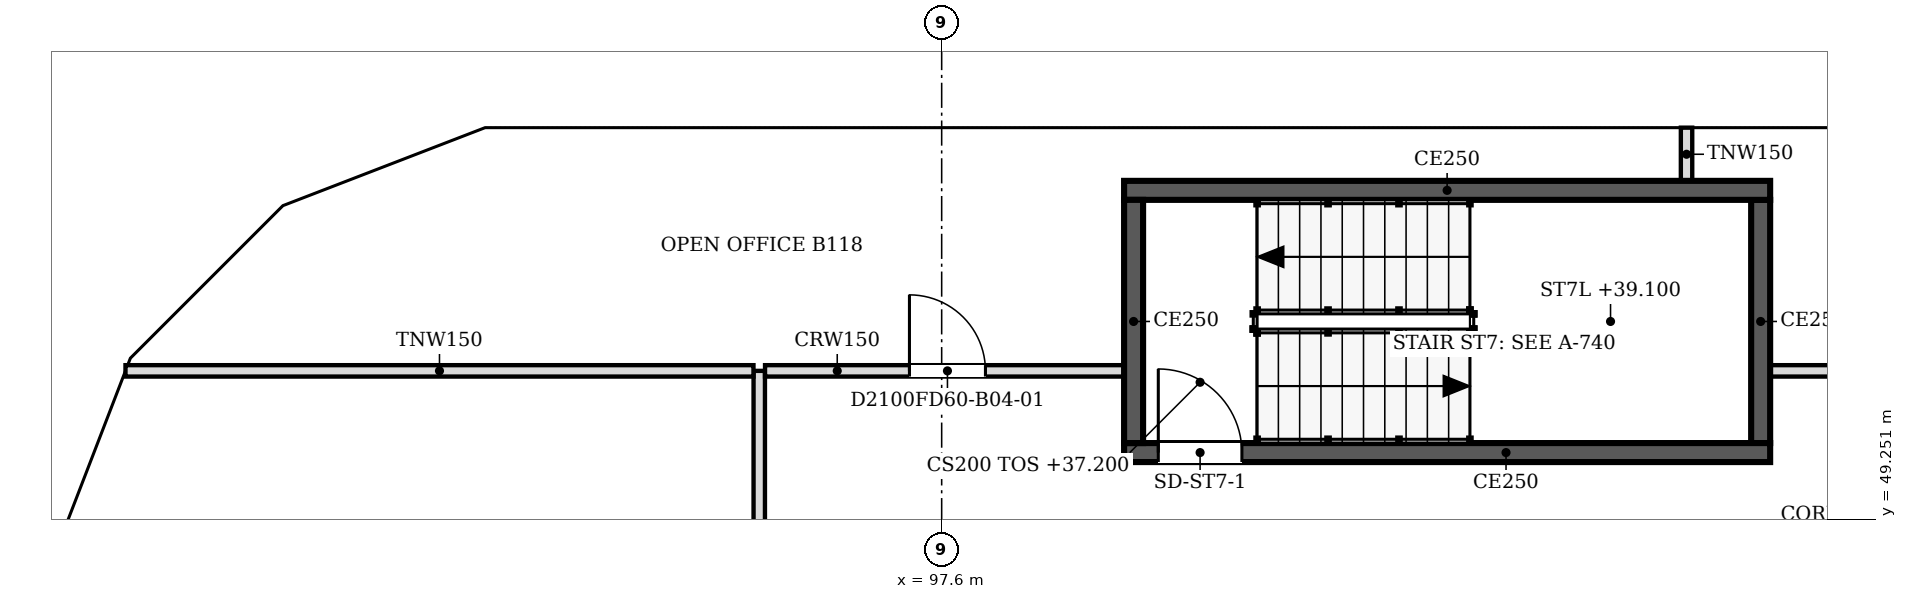
"""IFC4 building model, lengths in metres.
Left out: names, types, materials, properties, quantities, classifications, styles, units other than length and angle.
Written with IfcOpenShell. Run it as: python <this file> out.ifc"""

import sys

from ifc_helpers import new_model, si_unit, direction, frame, frame_2d, origin, place, context, subcontext, project, spatial, polyline, rectangle, outline, extrude, faceted_brep, source, transform, mapped, element, fill, save


model = new_model("IFC4")
c1 = context("Model", 3, precision=1e-05, world=origin(), true_north=direction((0.0, 1.0)))
c2 = subcontext(c1, "Body", "Model", "MODEL_VIEW")
j1 = project(units=[si_unit("LENGTHUNIT", "METRE"), si_unit("PLANEANGLEUNIT", "RADIAN")], contexts=[c1])
p1 = place(None, origin())
s1 = spatial("IfcSite", under=j1, at=p1, CompositionType="ELEMENT")
p2 = place(p1, origin())
s2 = spatial("IfcBuilding", under=s1, at=p2, CompositionType="ELEMENT")
p3 = place(p2, frame((0.0, 0.0, 37.2)))
s3 = spatial("IfcBuildingStorey", under=s2, at=p3, CompositionType="ELEMENT", Elevation=37.2)
m1 = source(origin(), c2, "Body", "SweptSolid", [
    extrude(outline(polyline([(3.05, 0.0), (6.1, 3.8), (3.05, 7.6), (0.0, 3.8), (3.05, 0.0)])), frame((0.0, 0.25, 0.0), z_axis=(0.0, -1.0, 0.0), x_axis=(1.0, 0.0, 0.0)), (0.0, 0.0, 1.0), 0.5),
])
p4 = place(p3, frame((109.8, 54.65, -3.8), z_axis=(0.0, 0.0, 1.0), x_axis=(-1.0, 0.0, 0.0)))
e1 = element("IfcWall", 1, at=p4, inside=s3, PredefinedType="SOLIDWALL", context=c2, shape_type="MappedRepresentation", body=[
    mapped(m1, transform((0.0, 0.0, 0.0), scale=1.0)),
])
m2 = source(origin(), c2, "Body", "SweptSolid", [
    extrude(outline(polyline([(3.05, 0.399), (5.78, 3.8), (3.05, 7.201), (0.321, 3.8), (3.05, 0.399)])), frame((0.0, 0.26, 0.0), z_axis=(0.0, -1.0, 0.0), x_axis=(1.0, 0.0, 0.0)), (0.0, 0.0, 1.0), 0.52),
])
p5 = place(p4, origin())
e2 = element("IfcOpeningElement", 2, at=p5, cuts=e1, PredefinedType="OPENING", context=c2, shape_type="MappedRepresentation", body=[
    mapped(m2, transform((0.0, 0.0, 0.0), scale=1.0)),
])
m3 = source(origin(), c2, "Body", "Brep", [
    faceted_brep([(3.05, -0.25, 0.0), (6.1, -0.25, 3.8), (6.1, -0.25, 3.8), (3.05, -0.25, 7.6), (0.0, -0.25, 3.8), (0.0, 0.25, 3.8), (3.05, 0.25, 7.6), (6.1, 0.25, 3.8), (6.1, 0.25, 3.8), (3.05, 0.25, 0.0)], [[[0, 1, 2, 3, 4]], [[5, 6, 7, 8, 9]], [[9, 8, 1, 0]], [[7, 6, 3, 2]], [[6, 5, 4, 3]], [[5, 9, 0, 4]], [[1, 8, 7, 2]]]),
])
p6 = place(p3, frame((103.7, 54.65, -3.8), z_axis=(0.0, 0.0, 1.0), x_axis=(-1.0, 0.0, 0.0)))
e3 = element("IfcWall", 3, at=p6, inside=s3, PredefinedType="SOLIDWALL", context=c2, shape_type="MappedRepresentation", body=[
    mapped(m3, transform((0.0, 0.0, 0.0), scale=1.0)),
])
p7 = place(p6, origin())
e4 = element("IfcOpeningElement", 4, at=p7, cuts=e3, PredefinedType="OPENING", context=c2, shape_type="MappedRepresentation", body=[
    mapped(m2, transform((0.0, 0.0, 0.0), scale=1.0)),
])
m4 = source(origin(), c2, "Body", "Brep", [
    faceted_brep([(3.05, -0.25, 0.0), (6.053, -0.25, 3.8), (3.05, -0.25, 7.6), (0.0, -0.25, 3.8), (0.0, 0.25, 3.8), (3.05, 0.25, 7.6), (6.007, 0.25, 3.859), (6.007, 0.25, 3.741), (3.05, 0.25, 0.0), (6.053, 0.0, 3.8)], [[[0, 1, 2, 3]], [[4, 5, 6, 7, 8]], [[8, 7, 9, 1, 0]], [[6, 5, 2, 1, 9]], [[5, 4, 3, 2]], [[4, 8, 0, 3]], [[9, 7, 6]]]),
])
p8 = place(p3, frame((97.6, 54.65, -3.8), z_axis=(0.0, 0.0, 1.0), x_axis=(-1.0, 0.0, 0.0)))
e5 = element("IfcWall", 5, at=p8, inside=s3, PredefinedType="SOLIDWALL", context=c2, shape_type="MappedRepresentation", body=[
    mapped(m4, transform((0.0, 0.0, 0.0), scale=1.0)),
])
m5 = source(origin(), c2, "Body", "SweptSolid", [
    extrude(outline(polyline([(3.049, 0.401), (5.735, 3.8), (3.049, 7.199), (0.321, 3.8), (3.049, 0.401)])), frame((0.0, 0.26, 0.0), z_axis=(0.0, -1.0, 0.0), x_axis=(1.0, 0.0, 0.0)), (0.0, 0.0, 1.0), 0.52),
])
p9 = place(p8, origin())
e6 = element("IfcOpeningElement", 6, at=p9, cuts=e5, PredefinedType="OPENING", context=c2, shape_type="MappedRepresentation", body=[
    mapped(m5, transform((0.0, 0.0, 0.0), scale=1.0)),
])
m6 = source(origin(), c2, "Body", "Brep", [
    faceted_brep([(2.95, -0.25, 0.0), (3.003, -0.25, 0.068), (3.003, -0.25, 7.532), (2.95, -0.25, 7.6), (0.0, -0.25, 3.8), (0.047, 0.25, 3.86), (2.898, 0.25, 7.532), (2.898, 0.25, 0.068), (0.047, 0.25, 3.74), (2.95, 0.0, 0.0), (2.95, 0.0, 7.6), (0.0, 0.0, 3.8)], [[[0, 1, 2, 3, 4]], [[5, 6, 7, 8]], [[1, 0, 9]], [[10, 3, 2]], [[6, 5, 11, 4, 3, 10]], [[8, 7, 9, 0, 4, 11]], [[8, 11, 5]], [[1, 9, 7, 6, 10, 2]]]),
])
p10 = place(p3, frame((91.547, 54.65, -3.8), z_axis=(0.0, 0.0, 1.0), x_axis=(-0.933007896601, -0.359855894603, 0.0)))
e7 = element("IfcWall", 7, at=p10, inside=s3, PredefinedType="SOLIDWALL", context=c2, shape_type="MappedRepresentation", body=[
    mapped(m6, transform((0.0, 0.0, 0.0), scale=1.0)),
])
m7 = source(origin(), c2, "Body", "SweptSolid", [
    extrude(outline(polyline([(2.75, 6.935), (0.316, 3.8), (2.75, 0.665), (2.75, 6.935)])), frame((0.0, 0.26, 0.0), z_axis=(0.0, -1.0, 0.0), x_axis=(1.0, 0.0, 0.0)), (0.0, 0.0, 1.0), 0.52),
])
p11 = place(p10, origin())
e8 = element("IfcOpeningElement", 8, at=p11, cuts=e7, PredefinedType="OPENING", context=c2, shape_type="MappedRepresentation", body=[
    mapped(m7, transform((0.0, 0.0, 0.0), scale=1.0)),
])
m8 = source(origin(), c2, "Body", "Brep", [
    faceted_brep([(0.053, -0.25, 0.0), (2.997, -0.25, 3.8), (0.053, -0.25, 7.6), (0.0, -0.25, 7.532), (0.0, -0.25, 0.068), (0.106, 0.25, 7.532), (2.944, 0.25, 3.868), (2.944, 0.25, 3.732), (0.106, 0.25, 0.068), (2.997, 0.0, 3.8), (0.053, 0.0, 0.0), (0.053, 0.0, 7.6)], [[[0, 1, 2, 3, 4]], [[5, 6, 7, 8]], [[8, 7, 9, 1, 0, 10]], [[6, 5, 11, 2, 1, 9]], [[3, 2, 11]], [[10, 0, 4]], [[8, 10, 4, 3, 11, 5]], [[9, 7, 6]]]),
])
p12 = place(p3, frame((88.831, 53.625, -3.8), z_axis=(0.0, 0.0, 1.0), x_axis=(-0.707147509625, -0.707066050402, 0.0)))
e9 = element("IfcWall", 9, at=p12, inside=s3, PredefinedType="SOLIDWALL", context=c2, shape_type="MappedRepresentation", body=[
    mapped(m8, transform((0.0, 0.0, 0.0), scale=1.0)),
])
m9 = source(origin(), c2, "Body", "SweptSolid", [
    extrude(outline(polyline([(0.253, 0.667), (2.681, 3.8), (0.253, 6.934), (0.253, 0.667)])), frame((0.0, 0.26, 0.0), z_axis=(0.0, -1.0, 0.0), x_axis=(1.0, 0.0, 0.0)), (0.0, 0.0, 1.0), 0.52),
])
p13 = place(p12, origin())
e10 = element("IfcOpeningElement", 10, at=p13, cuts=e9, PredefinedType="OPENING", context=c2, shape_type="MappedRepresentation", body=[
    mapped(m9, transform((0.0, 0.0, 0.0), scale=1.0)),
])
m10 = source(origin(), c2, "Body", "Brep", [
    faceted_brep([(2.95, -0.25, 0.0), (2.997, -0.25, 0.059), (2.997, -0.25, 7.541), (2.95, -0.25, 7.6), (0.0, -0.25, 3.8), (0.053, 0.25, 3.868), (2.904, 0.25, 7.54), (2.904, 0.25, 0.06), (0.053, 0.25, 3.732), (2.95, 0.0, 0.0), (2.95, 0.0, 7.6), (0.0, 0.0, 3.8)], [[[0, 1, 2, 3, 4]], [[5, 6, 7, 8]], [[1, 0, 9]], [[10, 3, 2]], [[6, 5, 11, 4, 3, 10]], [[8, 7, 9, 0, 4, 11]], [[8, 11, 5]], [[1, 9, 7, 6, 10, 2]]]),
])
p14 = place(p3, frame((86.712, 51.506, -3.8), z_axis=(0.0, 0.0, 1.0), x_axis=(-0.359874094142, -0.933000876937, 0.0)))
e11 = element("IfcWall", 11, at=p14, inside=s3, PredefinedType="SOLIDWALL", context=c2, shape_type="MappedRepresentation", body=[
    mapped(m10, transform((0.0, 0.0, 0.0), scale=1.0)),
])
p15 = place(p14, origin())
e12 = element("IfcOpeningElement", 12, at=p15, cuts=e11, PredefinedType="OPENING", context=c2, shape_type="MappedRepresentation", body=[
    mapped(m7, transform((0.0, 0.0, 0.0), scale=1.0)),
])
p16 = place(p2, frame((0.0, 0.0, 41.0)))
s4 = spatial("IfcBuildingStorey", under=s2, at=p16, CompositionType="ELEMENT", Elevation=41.0)
p17 = place(p16, frame((112.85, 54.65, -3.8), z_axis=(0.0, 0.0, 1.0), x_axis=(-1.0, 0.0, 0.0)))
e13 = element("IfcWall", 13, at=p17, inside=s4, PredefinedType="SOLIDWALL", context=c2, shape_type="MappedRepresentation", body=[
    mapped(m1, transform((0.0, 0.0, 0.0), scale=1.0)),
])
p18 = place(p17, origin())
e14 = element("IfcOpeningElement", 14, at=p18, cuts=e13, PredefinedType="OPENING", context=c2, shape_type="MappedRepresentation", body=[
    mapped(m2, transform((0.0, 0.0, 0.0), scale=1.0)),
])
p19 = place(p16, frame((106.75, 54.65, -3.8), z_axis=(0.0, 0.0, 1.0), x_axis=(-1.0, 0.0, 0.0)))
e15 = element("IfcWall", 15, at=p19, inside=s4, PredefinedType="SOLIDWALL", context=c2, shape_type="MappedRepresentation", body=[
    mapped(m1, transform((0.0, 0.0, 0.0), scale=1.0)),
])
p20 = place(p19, origin())
e16 = element("IfcOpeningElement", 16, at=p20, cuts=e15, PredefinedType="OPENING", context=c2, shape_type="MappedRepresentation", body=[
    mapped(m2, transform((0.0, 0.0, 0.0), scale=1.0)),
])
p21 = place(p16, frame((100.65, 54.65, -3.8), z_axis=(0.0, 0.0, 1.0), x_axis=(-1.0, 0.0, 0.0)))
e17 = element("IfcWall", 17, at=p21, inside=s4, PredefinedType="SOLIDWALL", context=c2, shape_type="MappedRepresentation", body=[
    mapped(m3, transform((0.0, 0.0, 0.0), scale=1.0)),
])
p22 = place(p21, origin())
e18 = element("IfcOpeningElement", 18, at=p22, cuts=e17, PredefinedType="OPENING", context=c2, shape_type="MappedRepresentation", body=[
    mapped(m2, transform((0.0, 0.0, 0.0), scale=1.0)),
])
m11 = source(origin(), c2, "Body", "Brep", [
    faceted_brep([(3.003, -0.25, 0.0), (3.05, -0.25, 0.06), (3.05, -0.25, 7.54), (3.003, -0.25, 7.6), (0.0, -0.25, 3.8), (0.0, 0.25, 3.8), (2.957, 0.25, 7.541), (2.957, 0.25, 0.059), (3.003, 0.0, 0.0), (3.003, 0.0, 7.6)], [[[0, 1, 2, 3, 4]], [[5, 6, 7]], [[1, 0, 8]], [[9, 3, 2]], [[6, 5, 4, 3, 9]], [[5, 7, 8, 0, 4]], [[1, 8, 7, 6, 9, 2]]]),
])
p23 = place(p16, frame((94.55, 54.65, -3.8), z_axis=(0.0, 0.0, 1.0), x_axis=(-1.0, 0.0, 0.0)))
e19 = element("IfcWall", 19, at=p23, inside=s4, PredefinedType="SOLIDWALL", context=c2, shape_type="MappedRepresentation", body=[
    mapped(m11, transform((0.0, 0.0, 0.0), scale=1.0)),
])
m12 = source(origin(), c2, "Body", "SweptSolid", [
    extrude(outline(polyline([(2.803, 6.944), (0.319, 3.8), (2.803, 0.656), (2.803, 6.944)])), frame((0.0, 0.26, 0.0), z_axis=(0.0, -1.0, 0.0), x_axis=(1.0, 0.0, 0.0)), (0.0, 0.0, 1.0), 0.52),
])
p24 = place(p23, origin())
e20 = element("IfcOpeningElement", 20, at=p24, cuts=e19, PredefinedType="OPENING", context=c2, shape_type="MappedRepresentation", body=[
    mapped(m12, transform((0.0, 0.0, 0.0), scale=1.0)),
])
m13 = source(origin(), c2, "Body", "Brep", [
    faceted_brep([(0.047, -0.25, 0.0), (2.997, -0.25, 3.8), (0.047, -0.25, 7.6), (0.0, -0.25, 7.541), (0.0, -0.25, 0.059), (0.093, 0.25, 7.54), (2.944, 0.25, 3.868), (2.944, 0.25, 3.732), (0.093, 0.25, 0.06), (2.997, 0.0, 3.8), (0.047, 0.0, 0.0), (0.047, 0.0, 7.6)], [[[0, 1, 2, 3, 4]], [[5, 6, 7, 8]], [[8, 7, 9, 1, 0, 10]], [[6, 5, 11, 2, 1, 9]], [[3, 2, 11]], [[10, 0, 4]], [[8, 10, 4, 3, 11, 5]], [[9, 7, 6]]]),
])
p25 = place(p16, frame((91.59, 54.667, -3.8), z_axis=(0.0, 0.0, 1.0), x_axis=(-0.933000876937, -0.359874094142, 0.0)))
e21 = element("IfcWall", 21, at=p25, inside=s4, PredefinedType="SOLIDWALL", context=c2, shape_type="MappedRepresentation", body=[
    mapped(m13, transform((0.0, 0.0, 0.0), scale=1.0)),
])
m14 = source(origin(), c2, "Body", "SweptSolid", [
    extrude(outline(polyline([(0.247, 0.665), (2.681, 3.8), (0.247, 6.935), (0.247, 0.665)])), frame((0.0, 0.26, 0.0), z_axis=(0.0, -1.0, 0.0), x_axis=(1.0, 0.0, 0.0)), (0.0, 0.0, 1.0), 0.52),
])
p26 = place(p25, origin())
e22 = element("IfcOpeningElement", 22, at=p26, cuts=e21, PredefinedType="OPENING", context=c2, shape_type="MappedRepresentation", body=[
    mapped(m14, transform((0.0, 0.0, 0.0), scale=1.0)),
])
m15 = source(origin(), c2, "Body", "Brep", [
    faceted_brep([(2.944, -0.25, 0.0), (2.997, -0.25, 0.068), (2.997, -0.25, 7.532), (2.944, -0.25, 7.6), (0.0, -0.25, 3.8), (0.053, 0.25, 3.868), (2.891, 0.25, 7.532), (2.891, 0.25, 0.068), (0.053, 0.25, 3.732), (2.944, 0.0, 0.0), (2.944, 0.0, 7.6), (0.0, 0.0, 3.8)], [[[0, 1, 2, 3, 4]], [[5, 6, 7, 8]], [[1, 0, 9]], [[10, 3, 2]], [[6, 5, 11, 4, 3, 10]], [[8, 7, 9, 0, 4, 11]], [[8, 11, 5]], [[1, 9, 7, 6, 10, 2]]]),
])
p27 = place(p16, frame((88.794, 53.588, -3.8), z_axis=(0.0, 0.0, 1.0), x_axis=(-0.707066050402, -0.707147509625, 0.0)))
e23 = element("IfcWall", 23, at=p27, inside=s4, PredefinedType="SOLIDWALL", context=c2, shape_type="MappedRepresentation", body=[
    mapped(m15, transform((0.0, 0.0, 0.0), scale=1.0)),
])
m16 = source(origin(), c2, "Body", "SweptSolid", [
    extrude(outline(polyline([(2.744, 6.934), (0.316, 3.8), (2.744, 0.666), (2.744, 6.934)])), frame((0.0, 0.26, 0.0), z_axis=(0.0, -1.0, 0.0), x_axis=(1.0, 0.0, 0.0)), (0.0, 0.0, 1.0), 0.52),
])
p28 = place(p27, origin())
e24 = element("IfcOpeningElement", 24, at=p28, cuts=e23, PredefinedType="OPENING", context=c2, shape_type="MappedRepresentation", body=[
    mapped(m16, transform((0.0, 0.0, 0.0), scale=1.0)),
])
m17 = source(origin(), c2, "Body", "Brep", [
    faceted_brep([(0.053, -0.25, 0.0), (3.003, -0.25, 3.8), (0.053, -0.25, 7.6), (0.0, -0.25, 7.532), (0.0, -0.25, 0.068), (0.106, 0.25, 7.532), (2.957, 0.25, 3.86), (2.957, 0.25, 3.74), (0.106, 0.25, 0.068), (3.003, 0.0, 3.8), (0.053, 0.0, 0.0), (0.053, 0.0, 7.6)], [[[0, 1, 2, 3, 4]], [[5, 6, 7, 8]], [[8, 7, 9, 1, 0, 10]], [[6, 5, 11, 2, 1, 9]], [[3, 2, 11]], [[10, 0, 4]], [[8, 10, 4, 3, 11, 5]], [[9, 7, 6]]]),
])
p29 = place(p16, frame((86.731, 51.556, -3.8), z_axis=(0.0, 0.0, 1.0), x_axis=(-0.359855894603, -0.933007896601, 0.0)))
e25 = element("IfcWall", 25, at=p29, inside=s4, PredefinedType="SOLIDWALL", context=c2, shape_type="MappedRepresentation", body=[
    mapped(m17, transform((0.0, 0.0, 0.0), scale=1.0)),
])
m18 = source(origin(), c2, "Body", "SweptSolid", [
    extrude(outline(polyline([(0.253, 0.665), (2.687, 3.8), (0.253, 6.935), (0.253, 0.665)])), frame((0.0, 0.26, 0.0), z_axis=(0.0, -1.0, 0.0), x_axis=(1.0, 0.0, 0.0)), (0.0, 0.0, 1.0), 0.52),
])
p30 = place(p29, origin())
e26 = element("IfcOpeningElement", 26, at=p30, cuts=e25, PredefinedType="OPENING", context=c2, shape_type="MappedRepresentation", body=[
    mapped(m18, transform((0.0, 0.0, 0.0), scale=1.0)),
])
p31 = place(p3, frame((108.5, 50.125, 0.0), z_axis=(0.0, 0.0, 1.0), x_axis=(-1.0, 0.0, 0.0)))
e27 = element("IfcWall", 27, at=p31, inside=s3, PredefinedType="SOLIDWALL", context=c2, shape_type="SweptSolid", body=[
    extrude(rectangle(XDim=8.5, YDim=0.25, at=frame_2d((4.25, 0.0))), origin(), (0.0, 0.0, 1.0), 3.8),
])
m19 = source(origin(), c2, "Body", "SweptSolid", [
    extrude(rectangle(XDim=1.1, YDim=2.1, at=frame_2d((0.55, 1.05))), frame((0.0, 0.135, 0.0), z_axis=(0.0, -1.0, 0.0), x_axis=(1.0, 0.0, 0.0)), (0.0, 0.0, 1.0), 0.27),
])
p32 = place(p31, frame((6.95, 0.0, 0.0)))
e28 = element("IfcOpeningElement", 28, at=p32, cuts=e27, PredefinedType="OPENING", context=c2, shape_type="MappedRepresentation", body=[
    mapped(m19, transform((0.0, 0.0, 0.0), scale=1.0)),
])
p33 = place(p3, frame((100.125, 50.25, 0.0), z_axis=(0.0, 0.0, 1.0), x_axis=(0.0, 1.0, 0.0)))
e29 = element("IfcWall", 29, at=p33, inside=s3, PredefinedType="SOLIDWALL", context=c2, shape_type="SweptSolid", body=[
    extrude(rectangle(XDim=3.2, YDim=0.25, at=frame_2d((1.6, 0.0))), origin(), (0.0, 0.0, 1.0), 3.8),
])
p34 = place(p3, frame((100.0, 53.575, 0.0), z_axis=(0.0, 0.0, 1.0), x_axis=(1.0, 0.0, 0.0)))
e30 = element("IfcWall", 30, at=p34, inside=s3, PredefinedType="SOLIDWALL", context=c2, shape_type="SweptSolid", body=[
    extrude(rectangle(XDim=8.5, YDim=0.25, at=frame_2d((4.25, 0.0))), origin(), (0.0, 0.0, 1.0), 3.8),
])
p35 = place(p3, frame((108.375, 53.45, 0.0), z_axis=(0.0, 0.0, 1.0), x_axis=(0.0, -1.0, 0.0)))
e31 = element("IfcWall", 31, at=p35, inside=s3, PredefinedType="SOLIDWALL", context=c2, shape_type="SweptSolid", body=[
    extrude(rectangle(XDim=3.2, YDim=0.25, at=frame_2d((1.6, 0.0))), origin(), (0.0, 0.0, 1.0), 3.8),
])
p36 = place(p3, frame((95.2, 36.676, 0.0), z_axis=(0.0, 0.0, 1.0), x_axis=(0.0, 1.0, 0.0)))
e32 = element("IfcWall", 32, at=p36, inside=s3, PredefinedType="PARTITIONING", context=c2, shape_type="SweptSolid", body=[
    extrude(rectangle(XDim=14.524, YDim=0.15, at=frame_2d((7.262, 0.0))), origin(), (0.0, 0.0, 1.0), 3.067),
])
m20 = source(origin(), c2, "Body", "SweptSolid", [
    extrude(rectangle(XDim=1.0, YDim=2.1, at=frame_2d((0.5, 1.05))), frame((0.0, 0.085, 0.0), z_axis=(0.0, -1.0, 0.0), x_axis=(1.0, 0.0, 0.0)), (0.0, 0.0, 1.0), 0.17),
])
p37 = place(p36, frame((11.225, 0.0, 0.0)))
e33 = element("IfcOpeningElement", 33, at=p37, cuts=e32, PredefinedType="OPENING", context=c2, shape_type="MappedRepresentation", body=[
    mapped(m20, transform((0.0, 0.0, 0.0), scale=1.0)),
])
p38 = place(p36, frame((4.0, 0.0, 0.0)))
e34 = element("IfcOpeningElement", 34, at=p38, cuts=e32, PredefinedType="OPENING", context=c2, shape_type="MappedRepresentation", body=[
    mapped(m20, transform((0.0, 0.0, 0.0), scale=1.0)),
])
p39 = place(p3, frame((86.862, 51.2, 0.0), z_axis=(0.0, 0.0, 1.0), x_axis=(1.0, 0.0, 0.0)))
e35 = element("IfcWall", 35, at=p39, inside=s3, PredefinedType="PARTITIONING", context=c2, shape_type="SweptSolid", body=[
    extrude(rectangle(XDim=8.262, YDim=0.15, at=frame_2d((4.131, 0.0))), origin(), (0.0, 0.0, 1.0), 3.067),
])
p40 = place(p3, frame((95.276, 51.2, 0.0), z_axis=(0.0, 0.0, 1.0), x_axis=(1.0, 0.0, 0.0)))
e36 = element("IfcWall", 36, at=p40, inside=s3, PredefinedType="PARTITIONING", context=c2, shape_type="SweptSolid", body=[
    extrude(rectangle(XDim=4.724, YDim=0.15, at=frame_2d((2.362, 0.0))), origin(), (0.0, 0.0, 1.0), 3.067),
])
p41 = place(p40, frame((1.9, 0.0, 0.0)))
e37 = element("IfcOpeningElement", 37, at=p41, cuts=e36, PredefinedType="OPENING", context=c2, shape_type="MappedRepresentation", body=[
    mapped(m20, transform((0.0, 0.0, 0.0), scale=1.0)),
])
p42 = place(p3, frame((108.5, 51.2, 0.0), z_axis=(0.0, 0.0, 1.0), x_axis=(1.0, 0.0, 0.0)))
e38 = element("IfcWall", 38, at=p42, inside=s3, PredefinedType="PARTITIONING", context=c2, shape_type="SweptSolid", body=[
    extrude(rectangle(XDim=15.9, YDim=0.15, at=frame_2d((7.95, 0.0))), origin(), (0.0, 0.0, 1.0), 3.067),
])
m21 = source(origin(), c2, "Body", "SweptSolid", [
    extrude(rectangle(XDim=0.9, YDim=2.1, at=frame_2d((0.45, 1.05))), frame((0.0, 0.085, 0.0), z_axis=(0.0, -1.0, 0.0), x_axis=(1.0, 0.0, 0.0)), (0.0, 0.0, 1.0), 0.17),
])
p43 = place(p42, frame((7.5, 0.0, 0.0)))
e39 = element("IfcOpeningElement", 39, at=p43, cuts=e38, PredefinedType="OPENING", context=c2, shape_type="MappedRepresentation", body=[
    mapped(m21, transform((0.0, 0.0, 0.0), scale=1.0)),
])
p44 = place(p3, frame((107.4, 53.7, 0.0), z_axis=(0.0, 0.0, 1.0), x_axis=(0.0, 1.0, 0.0)))
e40 = element("IfcWall", 40, at=p44, inside=s3, PredefinedType="PARTITIONING", context=c2, shape_type="SweptSolid", body=[
    extrude(rectangle(XDim=0.7, YDim=0.15, at=frame_2d((0.35, 0.0))), origin(), (0.0, 0.0, 1.0), 3.067),
])
m22 = source(origin(), c2, "Body", "SweptSolid", [
    extrude(rectangle(XDim=1.1, YDim=2.1, at=frame_2d((0.55, 1.05))), frame((0.0, 0.025, 0.0), z_axis=(0.0, -1.0, 0.0), x_axis=(1.0, 0.0, 0.0)), (0.0, 0.0, 1.0), 0.05),
])
p45 = place(p32, origin())
e41 = element("IfcDoor", 41, at=p45, inside=s3, OperationType="SINGLE_SWING_RIGHT", PredefinedType="DOOR", context=c2, shape_type="MappedRepresentation", body=[
    mapped(m22, transform((0.0, 0.0, 0.0), scale=1.0)),
])
fill(e28, e41)
m23 = source(origin(), c2, "Body", "SweptSolid", [
    extrude(rectangle(XDim=1.0, YDim=2.1, at=frame_2d((0.5, 1.05))), frame((0.0, 0.025, 0.0), z_axis=(0.0, -1.0, 0.0), x_axis=(1.0, 0.0, 0.0)), (0.0, 0.0, 1.0), 0.05),
])
p46 = place(p41, origin())
e42 = element("IfcDoor", 42, at=p46, inside=s3, OperationType="SINGLE_SWING_LEFT", PredefinedType="DOOR", context=c2, shape_type="MappedRepresentation", body=[
    mapped(m23, transform((0.0, 0.0, 0.0), scale=1.0)),
])
fill(e37, e42)
save(model, sys.argv[1])
